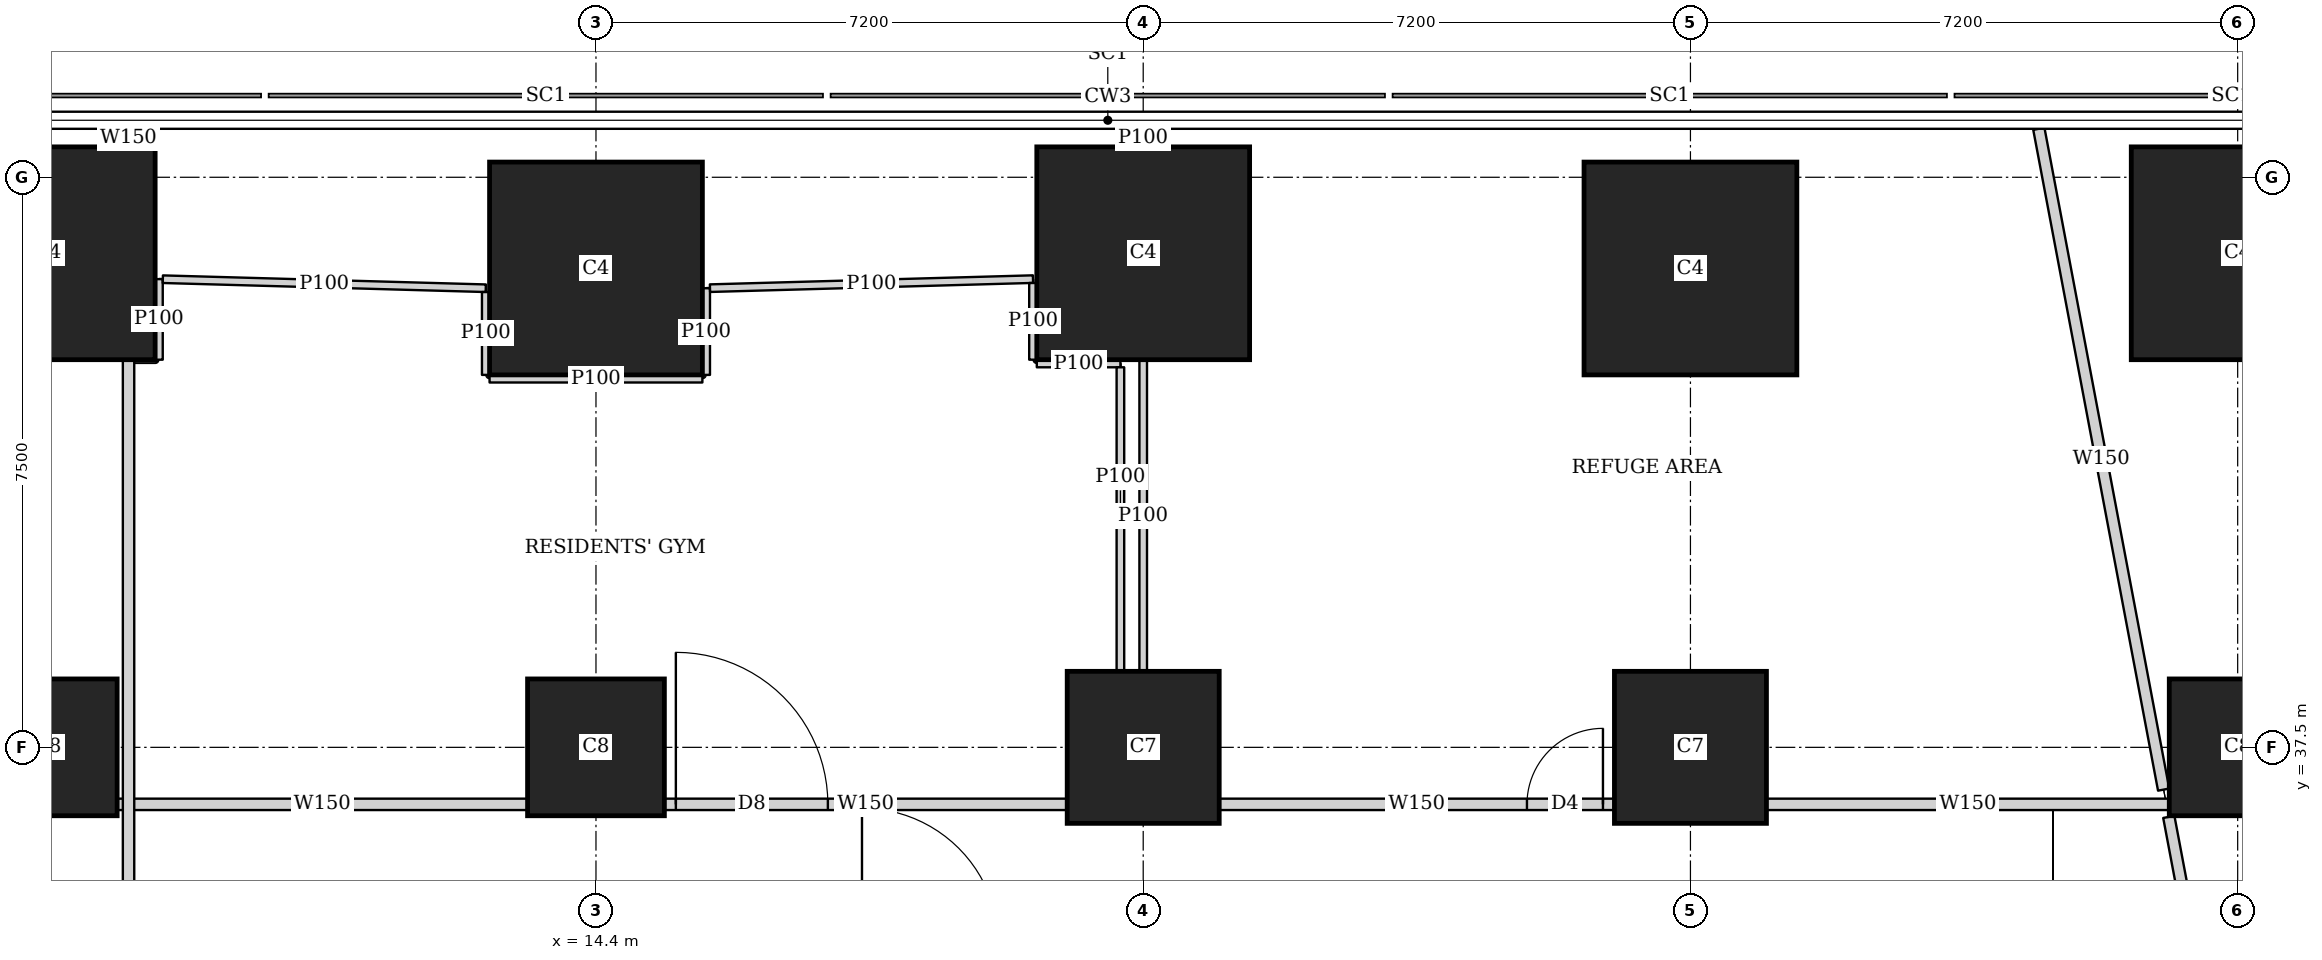
"""IFC4 building model, lengths in metres.
Left out: names, types, materials, properties, quantities, classifications, styles, units other than length and angle.
Written with IfcOpenShell. Run it as: python <this file> out.ifc"""

import sys

from ifc_helpers import new_model, si_unit, direction, frame, frame_2d, origin, origin_2d, place, context, subcontext, project, spatial, rectangle, extrude, element, fill, save


model = new_model("IFC4")
c1 = context("Model", 3, precision=1e-05, world=origin(), true_north=direction((0.0, 1.0)))
c2 = subcontext(c1, "Body", "Model", "MODEL_VIEW")
j1 = project(units=[si_unit("LENGTHUNIT", "METRE"), si_unit("PLANEANGLEUNIT", "RADIAN")], contexts=[c1])
p1 = place(None, origin())
s1 = spatial("IfcSite", under=j1, at=p1, CompositionType="ELEMENT")
p2 = place(p1, origin())
s2 = spatial("IfcBuilding", under=s1, at=p2, CompositionType="ELEMENT")
p3 = place(p2, frame((0.0, 0.0, 72.5)))
s3 = spatial("IfcBuildingStorey", under=s2, at=p3, CompositionType="ELEMENT", Elevation=72.5)
for number, where, z_axis, x_axis in (
    (1, (7.2, 37.5, 0.0), (0.0, 0.0, 1.0), (1.0, 0.0, 0.0)),
    (2, (14.4, 37.5, 0.0), (0.0, 0.0, 1.0), (1.0, 0.0, 0.0)),
):
    element("IfcColumn", number, at=place(p3, frame(where, z_axis=z_axis, x_axis=x_axis)), inside=s3, PredefinedType="COLUMN", context=c2, shape_type="SweptSolid", body=[
        extrude(rectangle(XDim=1.8, YDim=1.8, at=origin_2d()), origin(), (0.0, 0.0, 1.0), 5.4),
    ])
for number, where, z_axis, x_axis in (
    (3, (21.6, 37.5, 0.0), (0.0, 0.0, 1.0), (1.0, 0.0, 0.0)),
    (4, (28.8, 37.5, 0.0), (0.0, 0.0, 1.0), (1.0, 0.0, 0.0)),
):
    element("IfcColumn", number, at=place(p3, frame(where, z_axis=z_axis, x_axis=x_axis)), inside=s3, PredefinedType="COLUMN", context=c2, shape_type="SweptSolid", body=[
        extrude(rectangle(XDim=2.0, YDim=2.0, at=origin_2d()), origin(), (0.0, 0.0, 1.0), 5.4),
    ])
p4 = place(p3, frame((36.0, 37.5, 0.0), z_axis=(0.0, 0.0, 1.0), x_axis=(1.0, 0.0, 0.0)))
e5 = element("IfcColumn", 5, at=p4, inside=s3, PredefinedType="COLUMN", context=c2, shape_type="SweptSolid", body=[
    extrude(rectangle(XDim=1.8, YDim=1.8, at=origin_2d()), origin(), (0.0, 0.0, 1.0), 5.4),
])
for number, where, z_axis, x_axis in (
    (6, (7.2, 44.0, 0.0), (0.0, 0.0, 1.0), (1.0, 0.0, 0.0)),
    (7, (14.4, 43.8, 0.0), (0.0, 0.0, 1.0), (1.0, 0.0, 0.0)),
    (8, (21.6, 44.0, 0.0), (0.0, 0.0, 1.0), (1.0, 0.0, 0.0)),
    (9, (28.8, 43.8, 0.0), (0.0, 0.0, 1.0), (1.0, 0.0, 0.0)),
    (10, (36.0, 44.0, 0.0), (0.0, 0.0, 1.0), (1.0, 0.0, 0.0)),
):
    element("IfcColumn", number, at=place(p3, frame(where, z_axis=z_axis, x_axis=x_axis)), inside=s3, PredefinedType="COLUMN", context=c2, shape_type="SweptSolid", body=[
        extrude(rectangle(XDim=2.8, YDim=2.8, at=origin_2d()), origin(), (0.0, 0.0, 1.0), 5.4),
    ])
p5 = place(p3, frame((8.25, 2.426, 0.0), z_axis=(0.0, 0.0, 1.0), x_axis=(0.0, 1.0, 0.0)))
e11 = element("IfcWall", 11, at=p5, inside=s3, PredefinedType="SOLIDWALL", context=c2, shape_type="SweptSolid", body=[
    extrude(rectangle(XDim=40.173, YDim=0.15, at=frame_2d((20.086, 0.0))), origin(), (0.0, 0.0, 1.0), 3.55),
])
p6 = place(p5, frame((7.399, 0.0, 0.0)))
e12 = element("IfcOpeningElement", 12, at=p6, cuts=e11, PredefinedType="OPENING", context=c2, shape_type="SweptSolid", body=[
    extrude(rectangle(XDim=2.0, YDim=2.1, at=frame_2d((1.0, 1.05))), frame((0.0, 0.085, 0.0), z_axis=(0.0, -1.0, 0.0), x_axis=(1.0, 0.0, 0.0)), (0.0, 0.0, 1.0), 0.17),
])
p7 = place(p5, frame((31.249, 0.0, 0.0)))
e13 = element("IfcOpeningElement", 13, at=p7, cuts=e11, PredefinedType="OPENING", context=c2, shape_type="SweptSolid", body=[
    extrude(rectangle(XDim=1.0, YDim=2.1, at=frame_2d((0.5, 1.05))), frame((0.0, 0.085, 0.0), z_axis=(0.0, -1.0, 0.0), x_axis=(1.0, 0.0, 0.0)), (0.0, 0.0, 1.0), 0.17),
])
p8 = place(p3, frame((8.25, 45.401, 0.0), z_axis=(0.0, 0.0, 1.0), x_axis=(0.0, 1.0, 0.0)))
e14 = element("IfcWall", 14, at=p8, inside=s3, PredefinedType="SOLIDWALL", context=c2, shape_type="SweptSolid", body=[
    extrude(rectangle(XDim=0.237, YDim=0.15, at=frame_2d((0.119, 0.0))), origin(), (0.0, 0.0, 1.0), 5.15),
])
p9 = place(p3, frame((8.1, 36.75, 0.0), z_axis=(0.0, 0.0, 1.0), x_axis=(1.0, 0.0, 0.0)))
e15 = element("IfcWall", 15, at=p9, inside=s3, PredefinedType="SOLIDWALL", context=c2, shape_type="SweptSolid", body=[
    extrude(rectangle(XDim=5.399, YDim=0.15, at=frame_2d((2.699, 0.0))), origin(), (0.0, 0.0, 1.0), 3.55),
])
p10 = place(p3, frame((15.301, 36.75, 0.0), z_axis=(0.0, 0.0, 1.0), x_axis=(1.0, 0.0, 0.0)))
e16 = element("IfcWall", 16, at=p10, inside=s3, PredefinedType="SOLIDWALL", context=c2, shape_type="SweptSolid", body=[
    extrude(rectangle(XDim=5.298, YDim=0.15, at=frame_2d((2.649, 0.0))), origin(), (0.0, 0.0, 1.0), 3.15),
])
p11 = place(p10, frame((0.15, 0.0, 0.0)))
e17 = element("IfcOpeningElement", 17, at=p11, cuts=e16, PredefinedType="OPENING", context=c2, shape_type="SweptSolid", body=[
    extrude(rectangle(XDim=2.0, YDim=2.1, at=frame_2d((1.0, 1.05))), frame((0.0, 0.085, 0.0), z_axis=(0.0, -1.0, 0.0), x_axis=(1.0, 0.0, 0.0)), (0.0, 0.0, 1.0), 0.17),
])
p12 = place(p3, frame((22.601, 36.75, 0.0), z_axis=(0.0, 0.0, 1.0), x_axis=(1.0, 0.0, 0.0)))
e18 = element("IfcWall", 18, at=p12, inside=s3, PredefinedType="SOLIDWALL", context=c2, shape_type="SweptSolid", body=[
    extrude(rectangle(XDim=5.198, YDim=0.15, at=frame_2d((2.599, 0.0))), origin(), (0.0, 0.0, 1.0), 3.15),
])
p13 = place(p12, frame((4.048, 0.0, 0.0)))
e19 = element("IfcOpeningElement", 19, at=p13, cuts=e18, PredefinedType="OPENING", context=c2, shape_type="SweptSolid", body=[
    extrude(rectangle(XDim=1.0, YDim=2.1, at=frame_2d((0.5, 1.05))), frame((0.0, 0.085, 0.0), z_axis=(0.0, -1.0, 0.0), x_axis=(1.0, 0.0, 0.0)), (0.0, 0.0, 1.0), 0.17),
])
p14 = place(p3, frame((29.801, 36.75, 0.0), z_axis=(0.0, 0.0, 1.0), x_axis=(1.0, 0.0, 0.0)))
e20 = element("IfcWall", 20, at=p14, inside=s3, PredefinedType="SOLIDWALL", context=c2, shape_type="SweptSolid", body=[
    extrude(rectangle(XDim=5.299, YDim=0.15, at=frame_2d((2.649, 0.0))), origin(), (0.0, 0.0, 1.0), 3.15),
])
p15 = place(p3, frame((33.384, 45.638, 0.0), z_axis=(0.0, 0.0, 1.0), x_axis=(0.18557124981, -0.982630811263, 0.0)))
e21 = element("IfcWall", 21, at=p15, inside=s3, PredefinedType="SOLIDWALL", context=c2, shape_type="SweptSolid", body=[
    extrude(rectangle(XDim=8.847, YDim=0.15, at=frame_2d((4.424, 0.0))), origin(), (0.0, 0.0, 1.0), 3.35),
])
p16 = place(p3, frame((35.094, 36.585, 0.0), z_axis=(0.0, 0.0, 1.0), x_axis=(0.185591455861, -0.982626995106, 0.0)))
e22 = element("IfcWall", 22, at=p16, inside=s3, PredefinedType="SOLIDWALL", context=c2, shape_type="SweptSolid", body=[
    extrude(rectangle(XDim=35.735, YDim=0.15, at=frame_2d((17.867, 0.0))), origin(), (0.0, 0.0, 1.0), 3.35),
])
p17 = place(p16, frame((15.15, 0.0, 0.0)))
e23 = element("IfcOpeningElement", 23, at=p17, cuts=e22, PredefinedType="OPENING", context=c2, shape_type="SweptSolid", body=[
    extrude(rectangle(XDim=1.0, YDim=2.1, at=frame_2d((0.5, 1.05))), frame((0.0, 0.085, 0.0), z_axis=(0.0, -1.0, 0.0), x_axis=(1.0, 0.0, 0.0)), (0.0, 0.0, 1.0), 0.17),
])
p18 = place(p3, frame((21.6, 38.501, 0.0), z_axis=(0.0, 0.0, 1.0), x_axis=(0.0, 1.0, 0.0)))
e24 = element("IfcWall", 24, at=p18, inside=s3, PredefinedType="PARTITIONING", context=c2, shape_type="SweptSolid", body=[
    extrude(rectangle(XDim=4.098, YDim=0.1, at=frame_2d((2.049, 0.0))), origin(), (0.0, 0.0, 1.0), 3.55),
])
p19 = place(p3, frame((21.6, 45.401, 0.0), z_axis=(0.0, 0.0, 1.0), x_axis=(0.0, 1.0, 0.0)))
e25 = element("IfcWall", 25, at=p19, inside=s3, PredefinedType="PARTITIONING", context=c2, shape_type="SweptSolid", body=[
    extrude(rectangle(XDim=0.237, YDim=0.1, at=frame_2d((0.119, 0.0))), origin(), (0.0, 0.0, 1.0), 5.15),
])
p20 = place(p3, frame((8.65, 42.6, 0.0), z_axis=(0.0, 0.0, 1.0), x_axis=(0.0, 1.0, 0.0)))
e26 = element("IfcWall", 26, at=p20, inside=s3, PredefinedType="PARTITIONING", context=c2, shape_type="SweptSolid", body=[
    extrude(rectangle(XDim=1.06, YDim=0.1, at=frame_2d((0.53, 0.0))), origin(), (0.0, 0.0, 1.0), 3.35),
])
p21 = place(p3, frame((8.701, 43.659, 0.0), z_axis=(0.0, 0.0, 1.0), x_axis=(0.999608731549, -0.027971124584, 0.0)))
e27 = element("IfcWall", 27, at=p21, inside=s3, PredefinedType="PARTITIONING", context=c2, shape_type="SweptSolid", body=[
    extrude(rectangle(XDim=4.251, YDim=0.1, at=frame_2d((2.125, 0.0))), origin(), (0.0, 0.0, 1.0), 3.35),
])
p22 = place(p3, frame((12.95, 43.49, 0.0), z_axis=(0.0, 0.0, 1.0), x_axis=(0.0, -1.0, 0.0)))
e28 = element("IfcWall", 28, at=p22, inside=s3, PredefinedType="PARTITIONING", context=c2, shape_type="SweptSolid", body=[
    extrude(rectangle(XDim=1.09, YDim=0.1, at=frame_2d((0.545, 0.0))), origin(), (0.0, 0.0, 1.0), 3.35),
])
p23 = place(p3, frame((13.0, 42.35, 0.0), z_axis=(0.0, 0.0, 1.0), x_axis=(1.0, 0.0, 0.0)))
e29 = element("IfcWall", 29, at=p23, inside=s3, PredefinedType="PARTITIONING", context=c2, shape_type="SweptSolid", body=[
    extrude(rectangle(XDim=2.8, YDim=0.1, at=frame_2d((1.4, 0.0))), origin(), (0.0, 0.0, 1.0), 3.55),
])
p24 = place(p3, frame((15.85, 42.4, 0.0), z_axis=(0.0, 0.0, 1.0), x_axis=(0.0, 1.0, 0.0)))
e30 = element("IfcWall", 30, at=p24, inside=s3, PredefinedType="PARTITIONING", context=c2, shape_type="SweptSolid", body=[
    extrude(rectangle(XDim=1.14, YDim=0.1, at=frame_2d((0.57, 0.0))), origin(), (0.0, 0.0, 1.0), 3.35),
])
p25 = place(p3, frame((15.9, 43.541, 0.0), z_axis=(0.0, 0.0, 1.0), x_axis=(0.999608911234, 0.027964702423, 0.0)))
e31 = element("IfcWall", 31, at=p25, inside=s3, PredefinedType="PARTITIONING", context=c2, shape_type="SweptSolid", body=[
    extrude(rectangle(XDim=4.252, YDim=0.1, at=frame_2d((2.126, 0.0))), origin(), (0.0, 0.0, 1.0), 3.35),
])
p26 = place(p3, frame((20.15, 43.609, 0.0), z_axis=(0.0, 0.0, 1.0), x_axis=(0.0, -1.0, 0.0)))
e32 = element("IfcWall", 32, at=p26, inside=s3, PredefinedType="PARTITIONING", context=c2, shape_type="SweptSolid", body=[
    extrude(rectangle(XDim=1.009, YDim=0.1, at=frame_2d((0.504, 0.0))), origin(), (0.0, 0.0, 1.0), 3.35),
])
p27 = place(p3, frame((20.2, 42.55, 0.0), z_axis=(0.0, 0.0, 1.0), x_axis=(1.0, 0.0, 0.0)))
e33 = element("IfcWall", 33, at=p27, inside=s3, PredefinedType="PARTITIONING", context=c2, shape_type="SweptSolid", body=[
    extrude(rectangle(XDim=1.1, YDim=0.1, at=frame_2d((0.55, 0.0))), origin(), (0.0, 0.0, 1.0), 3.55),
])
p28 = place(p3, frame((21.3, 42.5, 0.0), z_axis=(0.0, 0.0, 1.0), x_axis=(0.0, -1.0, 0.0)))
e34 = element("IfcWall", 34, at=p28, inside=s3, PredefinedType="PARTITIONING", context=c2, shape_type="SweptSolid", body=[
    extrude(rectangle(XDim=3.999, YDim=0.1, at=frame_2d((2.0, 0.0))), origin(), (0.0, 0.0, 1.0), 3.55),
])
p29 = place(p11, origin())
e35 = element("IfcDoor", 35, at=p29, inside=s3, OperationType="DOUBLE_DOOR_SINGLE_SWING", PredefinedType="DOOR", context=c2, shape_type="SweptSolid", body=[
    extrude(rectangle(XDim=2.0, YDim=2.1, at=frame_2d((1.0, 1.05))), frame((0.0, 0.025, 0.0), z_axis=(0.0, -1.0, 0.0), x_axis=(1.0, 0.0, 0.0)), (0.0, 0.0, 1.0), 0.05),
])
fill(e17, e35)
p30 = place(p13, origin())
e36 = element("IfcDoor", 36, at=p30, inside=s3, OperationType="SINGLE_SWING_RIGHT", PredefinedType="DOOR", context=c2, shape_type="SweptSolid", body=[
    extrude(rectangle(XDim=1.0, YDim=2.1, at=frame_2d((0.5, 1.05))), frame((0.0, 0.025, 0.0), z_axis=(0.0, -1.0, 0.0), x_axis=(1.0, 0.0, 0.0)), (0.0, 0.0, 1.0), 0.05),
])
fill(e19, e36)
save(model, sys.argv[1])
